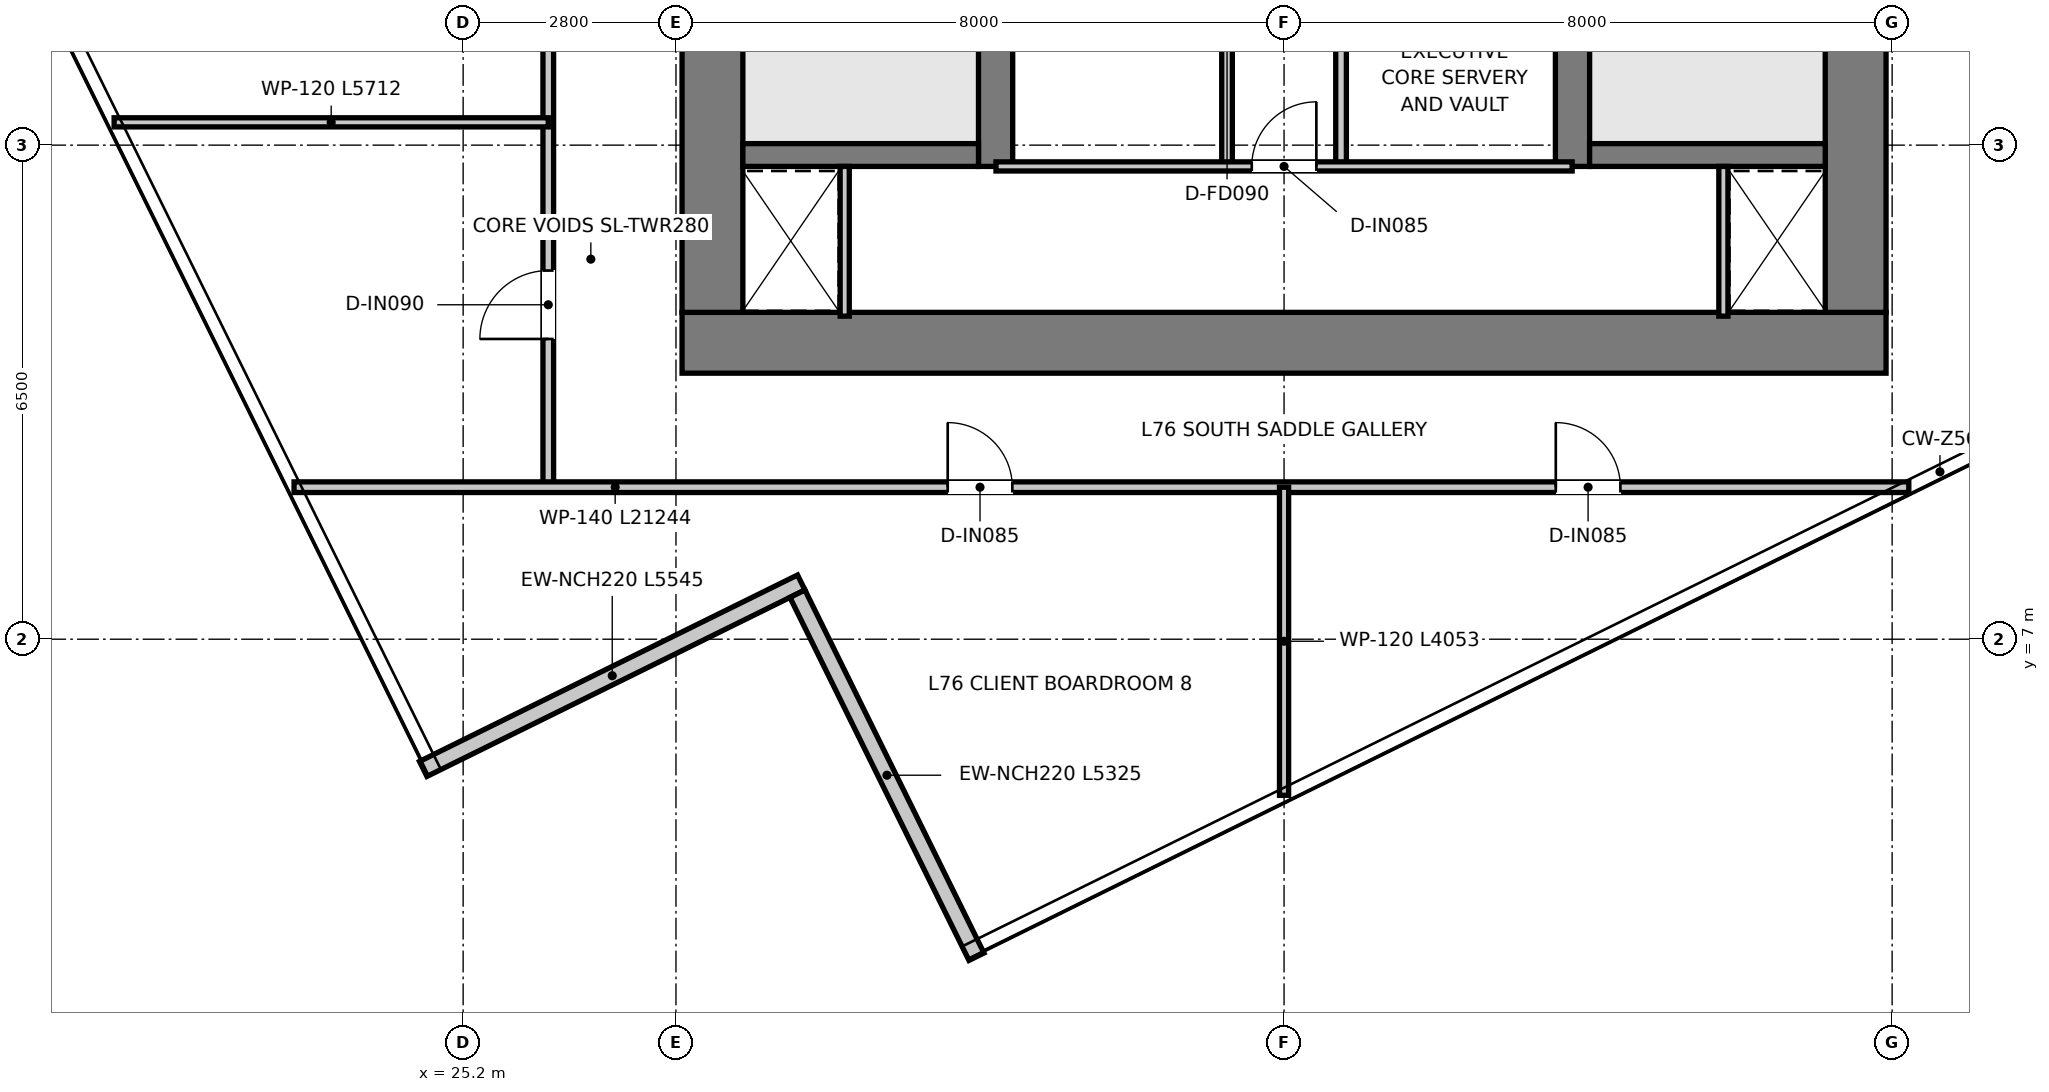
"""IFC4 building model, lengths in metres.
Left out: names, types, materials, properties, quantities, classifications, styles, units other than length and angle.
Written with IfcOpenShell. Run it as: python <this file> out.ifc"""

import sys

from ifc_helpers import new_model, si_unit, direction, frame, frame_2d, origin, place, context, subcontext, project, spatial, rectangle, extrude, element, fill, save


model = new_model("IFC4")
c1 = context("Model", 3, precision=1e-05, world=origin(), true_north=direction((0.0, 1.0)))
c2 = subcontext(c1, "Body", "Model", "MODEL_VIEW")
j1 = project(units=[si_unit("LENGTHUNIT", "METRE"), si_unit("PLANEANGLEUNIT", "RADIAN")], contexts=[c1])
p1 = place(None, origin())
s1 = spatial("IfcSite", under=j1, at=p1, CompositionType="ELEMENT")
p2 = place(p1, origin())
s2 = spatial("IfcBuilding", under=s1, at=p2, CompositionType="ELEMENT")
p3 = place(p2, frame((0.0, 0.0, 310.85)))
s3 = spatial("IfcBuildingStorey", under=s2, at=p3, CompositionType="ELEMENT", Elevation=310.85)
p4 = place(p3, frame((28.08, 10.9, 0.0), z_axis=(0.0, 0.0, 1.0), x_axis=(1.0, 0.0, 0.0)))
e1 = element("IfcWall", 1, at=p4, inside=s3, PredefinedType="SHEAR", context=c2, shape_type="SweptSolid", body=[
    extrude(rectangle(XDim=15.84, YDim=0.8, at=frame_2d((7.92, 0.0))), origin(), (0.0, 0.0, 1.0), 3.95),
])
for number, where, z_axis, x_axis in (
    (2, (28.48, 11.3, 0.0), (0.0, 0.0, 1.0), (0.0, 1.0, 0.0)),
    (3, (43.52, 11.3, 0.0), (0.0, 0.0, 1.0), (0.0, 1.0, 0.0)),
):
    element("IfcWall", number, at=place(p3, frame(where, z_axis=z_axis, x_axis=x_axis)), inside=s3, PredefinedType="SHEAR", context=c2, shape_type="SweptSolid", body=[
        extrude(rectangle(XDim=14.7, YDim=0.8, at=frame_2d((7.35, 0.0))), origin(), (0.0, 0.0, 1.0), 3.95),
    ])
p5 = place(p3, frame((32.205, 13.22, 0.0), z_axis=(0.0, 0.0, 1.0), x_axis=(0.0, 1.0, 0.0)))
e4 = element("IfcWall", 4, at=p5, inside=s3, PredefinedType="SHEAR", context=c2, shape_type="SweptSolid", body=[
    extrude(rectangle(XDim=12.78, YDim=0.45, at=frame_2d((6.39, 0.0))), origin(), (0.0, 0.0, 1.0), 3.95),
])
p6 = place(p5, frame((10.58, 0.0, 0.0)))
e5 = element("IfcOpeningElement", 5, at=p6, cuts=e4, PredefinedType="OPENING", context=c2, shape_type="SweptSolid", body=[
    extrude(rectangle(XDim=1.1, YDim=2.15, at=frame_2d((0.55, 1.075))), frame((0.0, 0.235, 0.0), z_axis=(0.0, -1.0, 0.0), x_axis=(1.0, 0.0, 0.0)), (0.0, 0.0, 1.0), 0.47),
])
p7 = place(p3, frame((39.795, 13.22, 0.0), z_axis=(0.0, 0.0, 1.0), x_axis=(0.0, 1.0, 0.0)))
e6 = element("IfcWall", 6, at=p7, inside=s3, PredefinedType="SHEAR", context=c2, shape_type="SweptSolid", body=[
    extrude(rectangle(XDim=12.78, YDim=0.45, at=frame_2d((6.39, 0.0))), origin(), (0.0, 0.0, 1.0), 3.95),
])
p8 = place(p7, frame((10.58, 0.0, 0.0)))
e7 = element("IfcOpeningElement", 7, at=p8, cuts=e6, PredefinedType="OPENING", context=c2, shape_type="SweptSolid", body=[
    extrude(rectangle(XDim=1.1, YDim=2.15, at=frame_2d((0.55, 1.075))), frame((0.0, 0.235, 0.0), z_axis=(0.0, -1.0, 0.0), x_axis=(1.0, 0.0, 0.0)), (0.0, 0.0, 1.0), 0.47),
])
for number, where, z_axis, x_axis in (
    (8, (28.88, 13.37, 0.0), (0.0, 0.0, 1.0), (1.0, 0.0, 0.0)),
    (9, (40.02, 13.37, 0.0), (0.0, 0.0, 1.0), (1.0, 0.0, 0.0)),
):
    element("IfcWall", number, at=place(p3, frame(where, z_axis=z_axis, x_axis=x_axis)), inside=s3, PredefinedType="SHEAR", context=c2, shape_type="SweptSolid", body=[
        extrude(rectangle(XDim=3.1, YDim=0.3, at=frame_2d((1.55, 0.0))), origin(), (0.0, 0.0, 1.0), 3.95),
    ])
p9 = place(p3, frame((24.675, 5.293, 0.0), z_axis=(0.0, 0.0, 1.0), x_axis=(0.896879244314, 0.442275503639, 0.0)))
e10 = element("IfcWall", 10, at=p9, inside=s3, PredefinedType="ELEMENTEDWALL", context=c2, shape_type="SweptSolid", body=[
    extrude(rectangle(XDim=5.545, YDim=0.22, at=frame_2d((2.772, 0.0))), origin(), (0.0, 0.0, 1.0), 3.67),
])
p10 = place(p3, frame((29.598, 7.599, 0.0), z_axis=(0.0, 0.0, 1.0), x_axis=(0.442291978932, -0.896871119712, 0.0)))
e11 = element("IfcWall", 11, at=p10, inside=s3, PredefinedType="ELEMENTEDWALL", context=c2, shape_type="SweptSolid", body=[
    extrude(rectangle(XDim=5.325, YDim=0.22, at=frame_2d((2.663, 0.0))), origin(), (0.0, 0.0, 1.0), 3.67),
])
p11 = place(p3, frame((35.25, 13.22, 0.0), z_axis=(0.0, 0.0, 1.0), x_axis=(0.0, 1.0, 0.0)))
e12 = element("IfcWall", 12, at=p11, inside=s3, PredefinedType="PARTITIONING", context=c2, shape_type="SweptSolid", body=[
    extrude(rectangle(XDim=4.56, YDim=0.14, at=frame_2d((2.28, 0.0))), origin(), (0.0, 0.0, 1.0), 3.67),
])
p12 = place(p11, frame((1.93, 0.0, 0.0)))
e13 = element("IfcOpeningElement", 13, at=p12, cuts=e12, PredefinedType="OPENING", context=c2, shape_type="SweptSolid", body=[
    extrude(rectangle(XDim=0.9, YDim=2.1, at=frame_2d((0.45, 1.05))), frame((0.0, 0.08, 0.0), z_axis=(0.0, -1.0, 0.0), x_axis=(1.0, 0.0, 0.0)), (0.0, 0.0, 1.0), 0.16),
])
p13 = place(p3, frame((36.75, 13.22, 0.0), z_axis=(0.0, 0.0, 1.0), x_axis=(0.0, 1.0, 0.0)))
e14 = element("IfcWall", 14, at=p13, inside=s3, PredefinedType="PARTITIONING", context=c2, shape_type="SweptSolid", body=[
    extrude(rectangle(XDim=4.56, YDim=0.14, at=frame_2d((2.28, 0.0))), origin(), (0.0, 0.0, 1.0), 3.67),
])
p14 = place(p13, frame((1.93, 0.0, 0.0)))
e15 = element("IfcOpeningElement", 15, at=p14, cuts=e14, PredefinedType="OPENING", context=c2, shape_type="SweptSolid", body=[
    extrude(rectangle(XDim=0.9, YDim=2.1, at=frame_2d((0.45, 1.05))), frame((0.0, 0.08, 0.0), z_axis=(0.0, -1.0, 0.0), x_axis=(1.0, 0.0, 0.0)), (0.0, 0.0, 1.0), 0.16),
])
for number, where, z_axis, x_axis in (
    (16, (30.22, 11.25, 0.0), (0.0, 0.0, 1.0), (0.0, 1.0, 0.0)),
    (17, (41.78, 11.25, 0.0), (0.0, 0.0, 1.0), (0.0, 1.0, 0.0)),
):
    element("IfcWall", number, at=place(p3, frame(where, z_axis=z_axis, x_axis=x_axis)), inside=s3, PredefinedType="PARTITIONING", context=c2, shape_type="SweptSolid", body=[
        extrude(rectangle(XDim=1.97, YDim=0.12, at=frame_2d((0.985, 0.0))), origin(), (0.0, 0.0, 1.0), 3.67),
    ])
p15 = place(p3, frame((32.21, 13.22, 0.0), z_axis=(0.0, 0.0, 1.0), x_axis=(1.0, 0.0, 0.0)))
e18 = element("IfcWall", 18, at=p15, inside=s3, PredefinedType="PARTITIONING", context=c2, shape_type="SweptSolid", body=[
    extrude(rectangle(XDim=7.58, YDim=0.12, at=frame_2d((3.79, 0.0))), origin(), (0.0, 0.0, 1.0), 3.67),
])
p16 = place(p15, frame((3.365, 0.0, 0.0)))
e19 = element("IfcOpeningElement", 19, at=p16, cuts=e18, PredefinedType="OPENING", context=c2, shape_type="SweptSolid", body=[
    extrude(rectangle(XDim=0.85, YDim=2.1, at=frame_2d((0.425, 1.05))), frame((0.0, 0.07, 0.0), z_axis=(0.0, -1.0, 0.0), x_axis=(1.0, 0.0, 0.0)), (0.0, 0.0, 1.0), 0.14),
])
p17 = place(p3, frame((26.32, 9.0, 0.0), z_axis=(0.0, 0.0, 1.0), x_axis=(0.0, 1.0, 0.0)))
e20 = element("IfcWall", 20, at=p17, inside=s3, PredefinedType="PARTITIONING", context=c2, shape_type="SweptSolid", body=[
    extrude(rectangle(XDim=19.66, YDim=0.14, at=frame_2d((9.83, 0.0))), origin(), (0.0, 0.0, 1.0), 3.13),
])
p18 = place(p17, frame((18.3, 0.0, 0.0)))
e21 = element("IfcOpeningElement", 21, at=p18, cuts=e20, PredefinedType="OPENING", context=c2, shape_type="SweptSolid", body=[
    extrude(rectangle(XDim=0.9, YDim=2.1, at=frame_2d((0.45, 1.05))), frame((0.0, 0.08, 0.0), z_axis=(0.0, -1.0, 0.0), x_axis=(1.0, 0.0, 0.0)), (0.0, 0.0, 1.0), 0.16),
])
p19 = place(p17, frame((1.95, 0.0, 0.0)))
e22 = element("IfcOpeningElement", 22, at=p19, cuts=e20, PredefinedType="OPENING", context=c2, shape_type="SweptSolid", body=[
    extrude(rectangle(XDim=0.9, YDim=2.1, at=frame_2d((0.45, 1.05))), frame((0.0, 0.08, 0.0), z_axis=(0.0, -1.0, 0.0), x_axis=(1.0, 0.0, 0.0)), (0.0, 0.0, 1.0), 0.16),
])
p20 = place(p17, frame((10.2, 0.0, 0.0)))
e23 = element("IfcOpeningElement", 23, at=p20, cuts=e20, PredefinedType="OPENING", context=c2, shape_type="SweptSolid", body=[
    extrude(rectangle(XDim=0.9, YDim=2.1, at=frame_2d((0.45, 1.05))), frame((0.0, 0.08, 0.0), z_axis=(0.0, -1.0, 0.0), x_axis=(1.0, 0.0, 0.0)), (0.0, 0.0, 1.0), 0.16),
])
p21 = place(p17, frame((14.86, 0.0, 0.0)))
e24 = element("IfcOpeningElement", 24, at=p21, cuts=e20, PredefinedType="OPENING", context=c2, shape_type="SweptSolid", body=[
    extrude(rectangle(XDim=0.9, YDim=2.1, at=frame_2d((0.45, 1.05))), frame((0.0, 0.08, 0.0), z_axis=(0.0, -1.0, 0.0), x_axis=(1.0, 0.0, 0.0)), (0.0, 0.0, 1.0), 0.16),
])
p22 = place(p3, frame((22.975, 9.0, 0.0), z_axis=(0.0, 0.0, 1.0), x_axis=(1.0, 0.0, 0.0)))
e25 = element("IfcWall", 25, at=p22, inside=s3, PredefinedType="PARTITIONING", context=c2, shape_type="SweptSolid", body=[
    extrude(rectangle(XDim=21.244, YDim=0.14, at=frame_2d((10.622, 0.0))), origin(), (0.0, 0.0, 1.0), 3.67),
])
p23 = place(p22, frame((8.6, 0.0, 0.0)))
e26 = element("IfcOpeningElement", 26, at=p23, cuts=e25, PredefinedType="OPENING", context=c2, shape_type="SweptSolid", body=[
    extrude(rectangle(XDim=0.85, YDim=2.1, at=frame_2d((0.425, 1.05))), frame((0.0, 0.08, 0.0), z_axis=(0.0, -1.0, 0.0), x_axis=(1.0, 0.0, 0.0)), (0.0, 0.0, 1.0), 0.16),
])
p24 = place(p22, frame((16.6, 0.0, 0.0)))
e27 = element("IfcOpeningElement", 27, at=p24, cuts=e25, PredefinedType="OPENING", context=c2, shape_type="SweptSolid", body=[
    extrude(rectangle(XDim=0.85, YDim=2.1, at=frame_2d((0.425, 1.05))), frame((0.0, 0.08, 0.0), z_axis=(0.0, -1.0, 0.0), x_axis=(1.0, 0.0, 0.0)), (0.0, 0.0, 1.0), 0.16),
])
p25 = place(p3, frame((20.608, 13.8, 0.0), z_axis=(0.0, 0.0, 1.0), x_axis=(1.0, 0.0, 0.0)))
e28 = element("IfcWall", 28, at=p25, inside=s3, PredefinedType="PARTITIONING", context=c2, shape_type="SweptSolid", body=[
    extrude(rectangle(XDim=5.712, YDim=0.12, at=frame_2d((2.856, 0.0))), origin(), (0.0, 0.0, 1.0), 3.18),
])
p26 = place(p3, frame((36.0, 4.947, 0.0), z_axis=(0.0, 0.0, 1.0), x_axis=(0.0, 1.0, 0.0)))
e29 = element("IfcWall", 29, at=p26, inside=s3, PredefinedType="PARTITIONING", context=c2, shape_type="SweptSolid", body=[
    extrude(rectangle(XDim=4.053, YDim=0.12, at=frame_2d((2.027, 0.0))), origin(), (0.0, 0.0, 1.0), 3.67),
])
p27 = place(p16, origin())
e30 = element("IfcDoor", 30, at=p27, inside=s3, OperationType="SINGLE_SWING_RIGHT", PredefinedType="DOOR", context=c2, shape_type="SweptSolid", body=[
    extrude(rectangle(XDim=0.85, YDim=2.1, at=frame_2d((0.425, 1.05))), frame((0.0, 0.025, 0.0), z_axis=(0.0, -1.0, 0.0), x_axis=(1.0, 0.0, 0.0)), (0.0, 0.0, 1.0), 0.05),
])
fill(e19, e30)
p28 = place(p19, origin())
e31 = element("IfcDoor", 31, at=p28, inside=s3, OperationType="SINGLE_SWING_LEFT", PredefinedType="DOOR", context=c2, shape_type="SweptSolid", body=[
    extrude(rectangle(XDim=0.9, YDim=2.1, at=frame_2d((0.45, 1.05))), frame((0.0, 0.025, 0.0), z_axis=(0.0, -1.0, 0.0), x_axis=(1.0, 0.0, 0.0)), (0.0, 0.0, 1.0), 0.05),
])
fill(e22, e31)
p29 = place(p23, origin())
e32 = element("IfcDoor", 32, at=p29, inside=s3, OperationType="SINGLE_SWING_LEFT", PredefinedType="DOOR", context=c2, shape_type="SweptSolid", body=[
    extrude(rectangle(XDim=0.85, YDim=2.1, at=frame_2d((0.425, 1.05))), frame((0.0, 0.025, 0.0), z_axis=(0.0, -1.0, 0.0), x_axis=(1.0, 0.0, 0.0)), (0.0, 0.0, 1.0), 0.05),
])
fill(e26, e32)
p30 = place(p24, origin())
e33 = element("IfcDoor", 33, at=p30, inside=s3, OperationType="SINGLE_SWING_LEFT", PredefinedType="DOOR", context=c2, shape_type="SweptSolid", body=[
    extrude(rectangle(XDim=0.85, YDim=2.1, at=frame_2d((0.425, 1.05))), frame((0.0, 0.025, 0.0), z_axis=(0.0, -1.0, 0.0), x_axis=(1.0, 0.0, 0.0)), (0.0, 0.0, 1.0), 0.05),
])
fill(e27, e33)
save(model, sys.argv[1])
